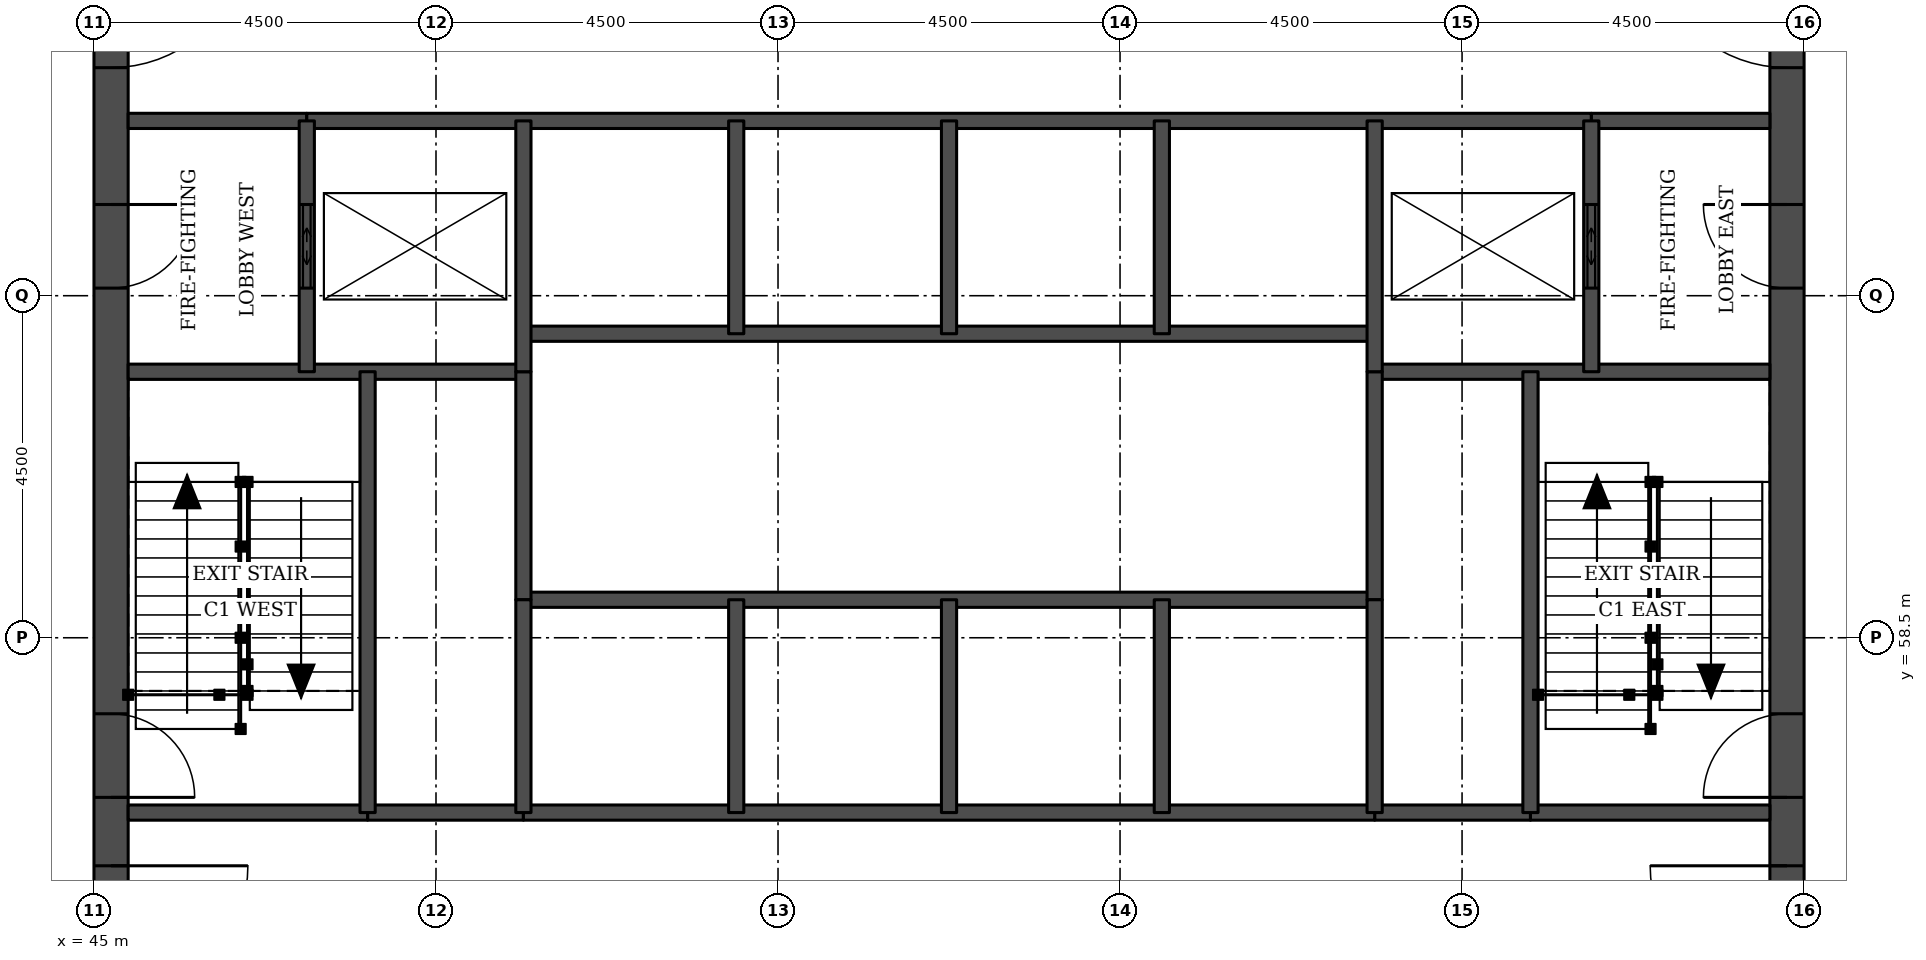
"""IFC4 building model, lengths in metres.
Left out: names, types, materials, properties, quantities, classifications, styles, units other than length and angle.
Written with IfcOpenShell. Run it as: python <this file> out.ifc"""

import sys

from ifc_helpers import new_model, si_unit, direction, frame, frame_2d, origin, place, context, subcontext, project, spatial, rectangle, extrude, element, fill, save


model = new_model("IFC4")
c1 = context("Model", 3, precision=1e-05, world=origin(), true_north=direction((0.0, 1.0)))
c2 = subcontext(c1, "Body", "Model", "MODEL_VIEW")
j1 = project(units=[si_unit("LENGTHUNIT", "METRE"), si_unit("PLANEANGLEUNIT", "RADIAN")], contexts=[c1])
p1 = place(None, origin())
s1 = spatial("IfcSite", under=j1, at=p1, CompositionType="ELEMENT")
p2 = place(p1, origin())
s2 = spatial("IfcBuilding", under=s1, at=p2, CompositionType="ELEMENT")
p3 = place(p2, frame((0.0, 0.0, 112.2)))
s3 = spatial("IfcBuildingStorey", under=s2, at=p3, CompositionType="ELEMENT", Elevation=112.2)
p4 = place(p3, frame((45.225, 49.5, 0.0), z_axis=(0.0, 0.0, 1.0), x_axis=(0.0, 1.0, 0.0)))
e1 = element("IfcWall", 1, at=p4, inside=s3, PredefinedType="SHEAR", context=c2, shape_type="SweptSolid", body=[
    extrude(rectangle(XDim=22.5, YDim=0.45, at=frame_2d((11.25, 0.0))), origin(), (0.0, 0.0, 1.0), 3.7),
])
p5 = place(p4, frame((4.2, 0.0, 0.0)))
e2 = element("IfcOpeningElement", 2, at=p5, cuts=e1, PredefinedType="OPENING", context=c2, shape_type="SweptSolid", body=[
    extrude(rectangle(XDim=1.8, YDim=2.1, at=frame_2d((0.9, 1.05))), frame((0.0, 0.235, 0.0), z_axis=(0.0, -1.0, 0.0), x_axis=(1.0, 0.0, 0.0)), (0.0, 0.0, 1.0), 0.47),
])
p6 = place(p4, frame((6.9, 0.0, 0.0)))
e3 = element("IfcOpeningElement", 3, at=p6, cuts=e1, PredefinedType="OPENING", context=c2, shape_type="SweptSolid", body=[
    extrude(rectangle(XDim=1.1, YDim=2.1, at=frame_2d((0.55, 1.05))), frame((0.0, 0.235, 0.0), z_axis=(0.0, -1.0, 0.0), x_axis=(1.0, 0.0, 0.0)), (0.0, 0.0, 1.0), 0.47),
])
p7 = place(p4, frame((13.6, 0.0, 0.0)))
e4 = element("IfcOpeningElement", 4, at=p7, cuts=e1, PredefinedType="OPENING", context=c2, shape_type="SweptSolid", body=[
    extrude(rectangle(XDim=1.1, YDim=2.1, at=frame_2d((0.55, 1.05))), frame((0.0, 0.235, 0.0), z_axis=(0.0, -1.0, 0.0), x_axis=(1.0, 0.0, 0.0)), (0.0, 0.0, 1.0), 0.47),
])
p8 = place(p4, frame((16.5, 0.0, 0.0)))
e5 = element("IfcOpeningElement", 5, at=p8, cuts=e1, PredefinedType="OPENING", context=c2, shape_type="SweptSolid", body=[
    extrude(rectangle(XDim=1.8, YDim=2.1, at=frame_2d((0.9, 1.05))), frame((0.0, 0.235, 0.0), z_axis=(0.0, -1.0, 0.0), x_axis=(1.0, 0.0, 0.0)), (0.0, 0.0, 1.0), 0.47),
])
p9 = place(p3, frame((67.275, 49.5, 0.0), z_axis=(0.0, 0.0, 1.0), x_axis=(0.0, 1.0, 0.0)))
e6 = element("IfcWall", 6, at=p9, inside=s3, PredefinedType="SHEAR", context=c2, shape_type="SweptSolid", body=[
    extrude(rectangle(XDim=22.5, YDim=0.45, at=frame_2d((11.25, 0.0))), origin(), (0.0, 0.0, 1.0), 3.7),
])
p10 = place(p9, frame((4.2, 0.0, 0.0)))
e7 = element("IfcOpeningElement", 7, at=p10, cuts=e6, PredefinedType="OPENING", context=c2, shape_type="SweptSolid", body=[
    extrude(rectangle(XDim=1.8, YDim=2.1, at=frame_2d((0.9, 1.05))), frame((0.0, 0.235, 0.0), z_axis=(0.0, -1.0, 0.0), x_axis=(1.0, 0.0, 0.0)), (0.0, 0.0, 1.0), 0.47),
])
p11 = place(p9, frame((6.9, 0.0, 0.0)))
e8 = element("IfcOpeningElement", 8, at=p11, cuts=e6, PredefinedType="OPENING", context=c2, shape_type="SweptSolid", body=[
    extrude(rectangle(XDim=1.1, YDim=2.1, at=frame_2d((0.55, 1.05))), frame((0.0, 0.235, 0.0), z_axis=(0.0, -1.0, 0.0), x_axis=(1.0, 0.0, 0.0)), (0.0, 0.0, 1.0), 0.47),
])
p12 = place(p9, frame((13.6, 0.0, 0.0)))
e9 = element("IfcOpeningElement", 9, at=p12, cuts=e6, PredefinedType="OPENING", context=c2, shape_type="SweptSolid", body=[
    extrude(rectangle(XDim=1.1, YDim=2.1, at=frame_2d((0.55, 1.05))), frame((0.0, 0.235, 0.0), z_axis=(0.0, -1.0, 0.0), x_axis=(1.0, 0.0, 0.0)), (0.0, 0.0, 1.0), 0.47),
])
p13 = place(p9, frame((16.5, 0.0, 0.0)))
e10 = element("IfcOpeningElement", 10, at=p13, cuts=e6, PredefinedType="OPENING", context=c2, shape_type="SweptSolid", body=[
    extrude(rectangle(XDim=1.8, YDim=2.1, at=frame_2d((0.9, 1.05))), frame((0.0, 0.235, 0.0), z_axis=(0.0, -1.0, 0.0), x_axis=(1.0, 0.0, 0.0)), (0.0, 0.0, 1.0), 0.47),
])
for number, where, z_axis, x_axis in (
    (11, (48.6, 56.2, 0.0), (0.0, 0.0, 1.0), (1.0, 0.0, 0.0)),
    (12, (61.85, 56.2, 0.0), (0.0, 0.0, 1.0), (1.0, 0.0, 0.0)),
):
    element("IfcWall", number, at=place(p3, frame(where, z_axis=z_axis, x_axis=x_axis)), inside=s3, PredefinedType="SOLIDWALL", context=c2, shape_type="SweptSolid", body=[
        extrude(rectangle(XDim=2.05, YDim=0.2, at=frame_2d((1.025, 0.0))), origin(), (0.0, 0.0, 1.0), 3.55),
    ])
p14 = place(p3, frame((45.45, 56.2, 0.0), z_axis=(0.0, 0.0, 1.0), x_axis=(1.0, 0.0, 0.0)))
e13 = element("IfcWall", 13, at=p14, inside=s3, PredefinedType="SOLIDWALL", context=c2, shape_type="SweptSolid", body=[
    extrude(rectangle(XDim=3.15, YDim=0.2, at=frame_2d((1.575, 0.0))), origin(), (0.0, 0.0, 1.0), 3.55),
])
p15 = place(p3, frame((50.65, 56.2, 0.0), z_axis=(0.0, 0.0, 1.0), x_axis=(1.0, 0.0, 0.0)))
e14 = element("IfcWall", 14, at=p15, inside=s3, PredefinedType="SOLIDWALL", context=c2, shape_type="SweptSolid", body=[
    extrude(rectangle(XDim=11.2, YDim=0.2, at=frame_2d((5.6, 0.0))), origin(), (0.0, 0.0, 1.0), 3.55),
])
p16 = place(p3, frame((63.9, 56.2, 0.0), z_axis=(0.0, 0.0, 1.0), x_axis=(1.0, 0.0, 0.0)))
e15 = element("IfcWall", 15, at=p16, inside=s3, PredefinedType="SOLIDWALL", context=c2, shape_type="SweptSolid", body=[
    extrude(rectangle(XDim=3.15, YDim=0.2, at=frame_2d((1.575, 0.0))), origin(), (0.0, 0.0, 1.0), 3.55),
])
p17 = place(p3, frame((50.65, 59.0, 0.0), z_axis=(0.0, 0.0, 1.0), x_axis=(1.0, 0.0, 0.0)))
e16 = element("IfcWall", 16, at=p17, inside=s3, PredefinedType="SOLIDWALL", context=c2, shape_type="SweptSolid", body=[
    extrude(rectangle(XDim=11.2, YDim=0.2, at=frame_2d((5.6, 0.0))), origin(), (0.0, 0.0, 1.0), 3.7),
])
for number, where, z_axis, x_axis in (
    (17, (45.45, 62.0, 0.0), (0.0, 0.0, 1.0), (1.0, 0.0, 0.0)),
    (18, (61.85, 62.0, 0.0), (0.0, 0.0, 1.0), (1.0, 0.0, 0.0)),
):
    element("IfcWall", number, at=place(p3, frame(where, z_axis=z_axis, x_axis=x_axis)), inside=s3, PredefinedType="SOLIDWALL", context=c2, shape_type="SweptSolid", body=[
        extrude(rectangle(XDim=5.2, YDim=0.2, at=frame_2d((2.6, 0.0))), origin(), (0.0, 0.0, 1.0), 3.55),
    ])
p18 = place(p3, frame((50.65, 62.5, 0.0), z_axis=(0.0, 0.0, 1.0), x_axis=(1.0, 0.0, 0.0)))
e19 = element("IfcWall", 19, at=p18, inside=s3, PredefinedType="SOLIDWALL", context=c2, shape_type="SweptSolid", body=[
    extrude(rectangle(XDim=11.2, YDim=0.2, at=frame_2d((5.6, 0.0))), origin(), (0.0, 0.0, 1.0), 3.7),
])
for number, where, z_axis, x_axis in (
    (20, (45.45, 65.3, 0.0), (0.0, 0.0, 1.0), (1.0, 0.0, 0.0)),
    (21, (64.7, 65.3, 0.0), (0.0, 0.0, 1.0), (1.0, 0.0, 0.0)),
):
    element("IfcWall", number, at=place(p3, frame(where, z_axis=z_axis, x_axis=x_axis)), inside=s3, PredefinedType="SOLIDWALL", context=c2, shape_type="SweptSolid", body=[
        extrude(rectangle(XDim=2.35, YDim=0.2, at=frame_2d((1.175, 0.0))), origin(), (0.0, 0.0, 1.0), 3.55),
    ])
p19 = place(p3, frame((47.8, 65.3, 0.0), z_axis=(0.0, 0.0, 1.0), x_axis=(1.0, 0.0, 0.0)))
e22 = element("IfcWall", 22, at=p19, inside=s3, PredefinedType="SOLIDWALL", context=c2, shape_type="SweptSolid", body=[
    extrude(rectangle(XDim=16.9, YDim=0.2, at=frame_2d((8.45, 0.0))), origin(), (0.0, 0.0, 1.0), 3.55),
])
p20 = place(p3, frame((47.8, 62.0, 0.0), z_axis=(0.0, 0.0, 1.0), x_axis=(0.0, 1.0, 0.0)))
e23 = element("IfcWall", 23, at=p20, inside=s3, PredefinedType="SOLIDWALL", context=c2, shape_type="SweptSolid", body=[
    extrude(rectangle(XDim=3.3, YDim=0.2, at=frame_2d((1.65, 0.0))), origin(), (0.0, 0.0, 1.0), 3.55),
])
p21 = place(p20, frame((1.1, 0.0, 0.0)))
e24 = element("IfcOpeningElement", 24, at=p21, cuts=e23, PredefinedType="OPENING", context=c2, shape_type="SweptSolid", body=[
    extrude(rectangle(XDim=1.1, YDim=2.1, at=frame_2d((0.55, 1.05))), frame((0.0, 0.11, 0.0), z_axis=(0.0, -1.0, 0.0), x_axis=(1.0, 0.0, 0.0)), (0.0, 0.0, 1.0), 0.22),
])
p22 = place(p3, frame((48.6, 56.2, 0.0), z_axis=(0.0, 0.0, 1.0), x_axis=(0.0, 1.0, 0.0)))
e25 = element("IfcWall", 25, at=p22, inside=s3, PredefinedType="SOLIDWALL", context=c2, shape_type="SweptSolid", body=[
    extrude(rectangle(XDim=5.8, YDim=0.2, at=frame_2d((2.9, 0.0))), origin(), (0.0, 0.0, 1.0), 3.55),
])
p23 = place(p3, frame((50.65, 59.0, 0.0), z_axis=(0.0, 0.0, 1.0), x_axis=(0.0, 1.0, 0.0)))
e26 = element("IfcWall", 26, at=p23, inside=s3, PredefinedType="SOLIDWALL", context=c2, shape_type="SweptSolid", body=[
    extrude(rectangle(XDim=3.0, YDim=0.2, at=frame_2d((1.5, 0.0))), origin(), (0.0, 0.0, 1.0), 3.7),
])
p24 = place(p3, frame((50.65, 56.2, 0.0), z_axis=(0.0, 0.0, 1.0), x_axis=(0.0, 1.0, 0.0)))
e27 = element("IfcWall", 27, at=p24, inside=s3, PredefinedType="SOLIDWALL", context=c2, shape_type="SweptSolid", body=[
    extrude(rectangle(XDim=2.8, YDim=0.2, at=frame_2d((1.4, 0.0))), origin(), (0.0, 0.0, 1.0), 3.55),
])
p25 = place(p3, frame((50.65, 62.0, 0.0), z_axis=(0.0, 0.0, 1.0), x_axis=(0.0, 1.0, 0.0)))
e28 = element("IfcWall", 28, at=p25, inside=s3, PredefinedType="SOLIDWALL", context=c2, shape_type="SweptSolid", body=[
    extrude(rectangle(XDim=3.3, YDim=0.2, at=frame_2d((1.65, 0.0))), origin(), (0.0, 0.0, 1.0), 3.55),
])
for number, where, z_axis, x_axis in (
    (29, (53.45, 56.2, 0.0), (0.0, 0.0, 1.0), (0.0, 1.0, 0.0)),
    (30, (53.45, 62.5, 0.0), (0.0, 0.0, 1.0), (0.0, 1.0, 0.0)),
    (31, (56.25, 56.2, 0.0), (0.0, 0.0, 1.0), (0.0, 1.0, 0.0)),
    (32, (56.25, 62.5, 0.0), (0.0, 0.0, 1.0), (0.0, 1.0, 0.0)),
    (33, (59.05, 56.2, 0.0), (0.0, 0.0, 1.0), (0.0, 1.0, 0.0)),
    (34, (59.05, 62.5, 0.0), (0.0, 0.0, 1.0), (0.0, 1.0, 0.0)),
):
    element("IfcWall", number, at=place(p3, frame(where, z_axis=z_axis, x_axis=x_axis)), inside=s3, PredefinedType="SOLIDWALL", context=c2, shape_type="SweptSolid", body=[
        extrude(rectangle(XDim=2.8, YDim=0.2, at=frame_2d((1.4, 0.0))), origin(), (0.0, 0.0, 1.0), 3.55),
    ])
p26 = place(p3, frame((61.85, 59.0, 0.0), z_axis=(0.0, 0.0, 1.0), x_axis=(0.0, 1.0, 0.0)))
e35 = element("IfcWall", 35, at=p26, inside=s3, PredefinedType="SOLIDWALL", context=c2, shape_type="SweptSolid", body=[
    extrude(rectangle(XDim=3.0, YDim=0.2, at=frame_2d((1.5, 0.0))), origin(), (0.0, 0.0, 1.0), 3.7),
])
p27 = place(p3, frame((61.85, 56.2, 0.0), z_axis=(0.0, 0.0, 1.0), x_axis=(0.0, 1.0, 0.0)))
e36 = element("IfcWall", 36, at=p27, inside=s3, PredefinedType="SOLIDWALL", context=c2, shape_type="SweptSolid", body=[
    extrude(rectangle(XDim=2.8, YDim=0.2, at=frame_2d((1.4, 0.0))), origin(), (0.0, 0.0, 1.0), 3.55),
])
p28 = place(p3, frame((61.85, 62.0, 0.0), z_axis=(0.0, 0.0, 1.0), x_axis=(0.0, 1.0, 0.0)))
e37 = element("IfcWall", 37, at=p28, inside=s3, PredefinedType="SOLIDWALL", context=c2, shape_type="SweptSolid", body=[
    extrude(rectangle(XDim=3.3, YDim=0.2, at=frame_2d((1.65, 0.0))), origin(), (0.0, 0.0, 1.0), 3.55),
])
p29 = place(p3, frame((63.9, 56.2, 0.0), z_axis=(0.0, 0.0, 1.0), x_axis=(0.0, 1.0, 0.0)))
e38 = element("IfcWall", 38, at=p29, inside=s3, PredefinedType="SOLIDWALL", context=c2, shape_type="SweptSolid", body=[
    extrude(rectangle(XDim=5.8, YDim=0.2, at=frame_2d((2.9, 0.0))), origin(), (0.0, 0.0, 1.0), 3.55),
])
p30 = place(p3, frame((64.7, 62.0, 0.0), z_axis=(0.0, 0.0, 1.0), x_axis=(0.0, 1.0, 0.0)))
e39 = element("IfcWall", 39, at=p30, inside=s3, PredefinedType="SOLIDWALL", context=c2, shape_type="SweptSolid", body=[
    extrude(rectangle(XDim=3.3, YDim=0.2, at=frame_2d((1.65, 0.0))), origin(), (0.0, 0.0, 1.0), 3.55),
])
p31 = place(p30, frame((1.1, 0.0, 0.0)))
e40 = element("IfcOpeningElement", 40, at=p31, cuts=e39, PredefinedType="OPENING", context=c2, shape_type="SweptSolid", body=[
    extrude(rectangle(XDim=1.1, YDim=2.1, at=frame_2d((0.55, 1.05))), frame((0.0, 0.11, 0.0), z_axis=(0.0, -1.0, 0.0), x_axis=(1.0, 0.0, 0.0)), (0.0, 0.0, 1.0), 0.22),
])
p32 = place(p21, origin())
e41 = element("IfcDoor", 41, at=p32, inside=s3, OperationType="DOUBLE_DOOR_SLIDING", PredefinedType="DOOR", context=c2, shape_type="SweptSolid", body=[
    extrude(rectangle(XDim=1.1, YDim=2.1, at=frame_2d((0.55, 1.05))), frame((0.0, 0.025, 0.0), z_axis=(0.0, -1.0, 0.0), x_axis=(1.0, 0.0, 0.0)), (0.0, 0.0, 1.0), 0.05),
])
fill(e24, e41)
p33 = place(p31, origin())
e42 = element("IfcDoor", 42, at=p33, inside=s3, OperationType="DOUBLE_DOOR_SLIDING", PredefinedType="DOOR", context=c2, shape_type="SweptSolid", body=[
    extrude(rectangle(XDim=1.1, YDim=2.1, at=frame_2d((0.55, 1.05))), frame((0.0, 0.025, 0.0), z_axis=(0.0, -1.0, 0.0), x_axis=(1.0, 0.0, 0.0)), (0.0, 0.0, 1.0), 0.05),
])
fill(e40, e42)
p34 = place(p5, frame((1.8, 0.0, 0.0), z_axis=(0.0, 0.0, 1.0), x_axis=(-1.0, 0.0, 0.0)))
e43 = element("IfcDoor", 43, at=p34, inside=s3, OperationType="SINGLE_SWING_LEFT", PredefinedType="DOOR", context=c2, shape_type="SweptSolid", body=[
    extrude(rectangle(XDim=1.8, YDim=2.1, at=frame_2d((0.9, 1.05))), frame((0.0, 0.025, 0.0), z_axis=(0.0, -1.0, 0.0), x_axis=(1.0, 0.0, 0.0)), (0.0, 0.0, 1.0), 0.05),
])
fill(e2, e43)
p35 = place(p6, frame((1.1, 0.0, 0.0), z_axis=(0.0, 0.0, 1.0), x_axis=(-1.0, 0.0, 0.0)))
e44 = element("IfcDoor", 44, at=p35, inside=s3, OperationType="SINGLE_SWING_RIGHT", PredefinedType="DOOR", context=c2, shape_type="SweptSolid", body=[
    extrude(rectangle(XDim=1.1, YDim=2.1, at=frame_2d((0.55, 1.05))), frame((0.0, 0.025, 0.0), z_axis=(0.0, -1.0, 0.0), x_axis=(1.0, 0.0, 0.0)), (0.0, 0.0, 1.0), 0.05),
])
fill(e3, e44)
p36 = place(p7, frame((1.1, 0.0, 0.0), z_axis=(0.0, 0.0, 1.0), x_axis=(-1.0, 0.0, 0.0)))
e45 = element("IfcDoor", 45, at=p36, inside=s3, OperationType="SINGLE_SWING_LEFT", PredefinedType="DOOR", context=c2, shape_type="SweptSolid", body=[
    extrude(rectangle(XDim=1.1, YDim=2.1, at=frame_2d((0.55, 1.05))), frame((0.0, 0.025, 0.0), z_axis=(0.0, -1.0, 0.0), x_axis=(1.0, 0.0, 0.0)), (0.0, 0.0, 1.0), 0.05),
])
fill(e4, e45)
p37 = place(p8, frame((1.8, 0.0, 0.0), z_axis=(0.0, 0.0, 1.0), x_axis=(-1.0, 0.0, 0.0)))
e46 = element("IfcDoor", 46, at=p37, inside=s3, OperationType="SINGLE_SWING_LEFT", PredefinedType="DOOR", context=c2, shape_type="SweptSolid", body=[
    extrude(rectangle(XDim=1.8, YDim=2.1, at=frame_2d((0.9, 1.05))), frame((0.0, 0.025, 0.0), z_axis=(0.0, -1.0, 0.0), x_axis=(1.0, 0.0, 0.0)), (0.0, 0.0, 1.0), 0.05),
])
fill(e5, e46)
p38 = place(p10, origin())
e47 = element("IfcDoor", 47, at=p38, inside=s3, OperationType="SINGLE_SWING_RIGHT", PredefinedType="DOOR", context=c2, shape_type="SweptSolid", body=[
    extrude(rectangle(XDim=1.8, YDim=2.1, at=frame_2d((0.9, 1.05))), frame((0.0, 0.025, 0.0), z_axis=(0.0, -1.0, 0.0), x_axis=(1.0, 0.0, 0.0)), (0.0, 0.0, 1.0), 0.05),
])
fill(e7, e47)
p39 = place(p11, origin())
e48 = element("IfcDoor", 48, at=p39, inside=s3, OperationType="SINGLE_SWING_LEFT", PredefinedType="DOOR", context=c2, shape_type="SweptSolid", body=[
    extrude(rectangle(XDim=1.1, YDim=2.1, at=frame_2d((0.55, 1.05))), frame((0.0, 0.025, 0.0), z_axis=(0.0, -1.0, 0.0), x_axis=(1.0, 0.0, 0.0)), (0.0, 0.0, 1.0), 0.05),
])
fill(e8, e48)
p40 = place(p12, origin())
e49 = element("IfcDoor", 49, at=p40, inside=s3, OperationType="SINGLE_SWING_RIGHT", PredefinedType="DOOR", context=c2, shape_type="SweptSolid", body=[
    extrude(rectangle(XDim=1.1, YDim=2.1, at=frame_2d((0.55, 1.05))), frame((0.0, 0.025, 0.0), z_axis=(0.0, -1.0, 0.0), x_axis=(1.0, 0.0, 0.0)), (0.0, 0.0, 1.0), 0.05),
])
fill(e9, e49)
p41 = place(p13, origin())
e50 = element("IfcDoor", 50, at=p41, inside=s3, OperationType="SINGLE_SWING_RIGHT", PredefinedType="DOOR", context=c2, shape_type="SweptSolid", body=[
    extrude(rectangle(XDim=1.8, YDim=2.1, at=frame_2d((0.9, 1.05))), frame((0.0, 0.025, 0.0), z_axis=(0.0, -1.0, 0.0), x_axis=(1.0, 0.0, 0.0)), (0.0, 0.0, 1.0), 0.05),
])
fill(e10, e50)
save(model, sys.argv[1])
